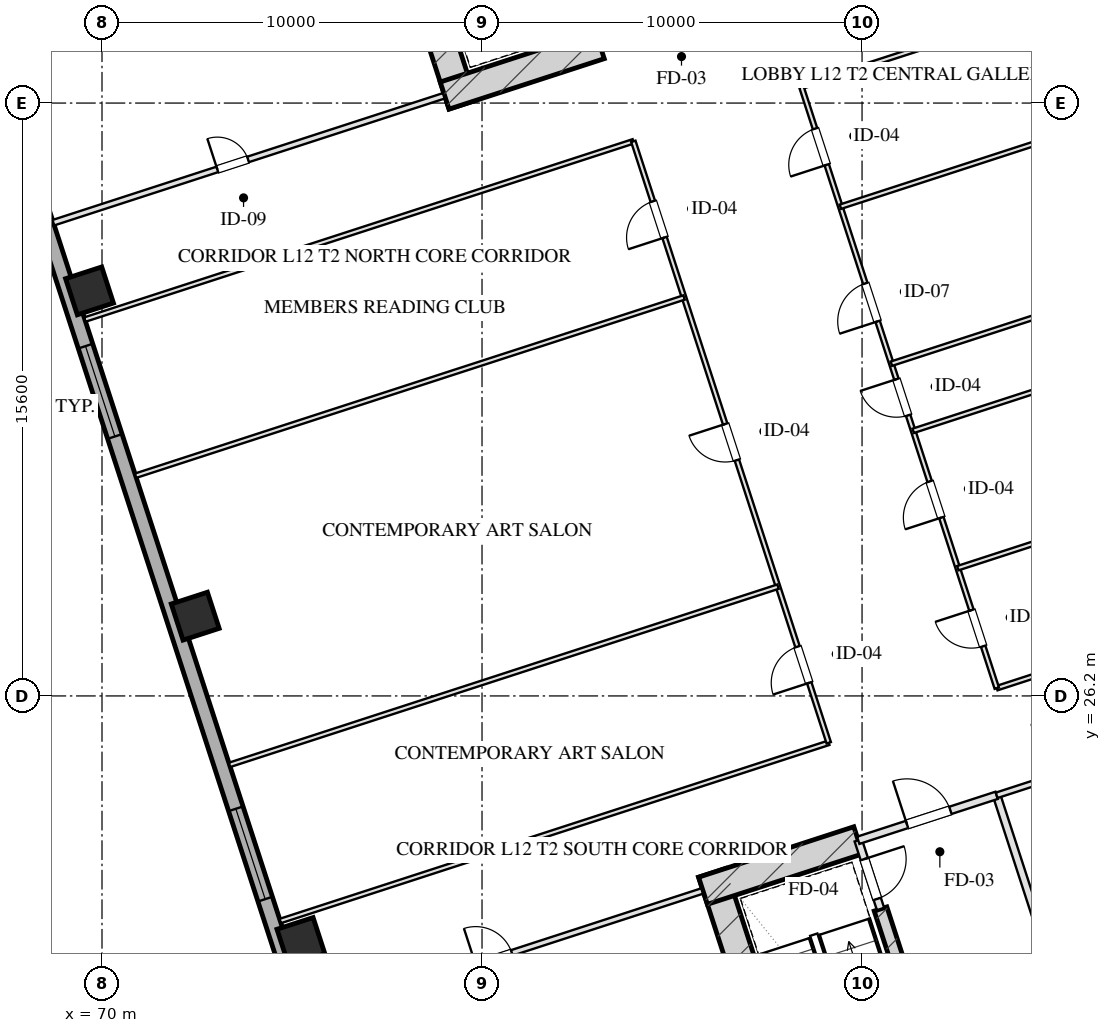
"""IFC4 building model, lengths in metres.
Left out: names, types, materials, properties, quantities, classifications, styles, units other than length and angle.
Written with IfcOpenShell. Run it as: python <this file> out.ifc"""

import sys

from ifc_helpers import new_model, si_unit, direction, frame, frame_2d, origin, origin_2d, place, context, subcontext, project, spatial, rectangle, hollow_rectangle, extrude, element, fill, save


model = new_model("IFC4")
c1 = context("Model", 3, precision=1e-05, world=origin(), true_north=direction((0.0, 1.0)))
c2 = subcontext(c1, "Body", "Model", "MODEL_VIEW")
j1 = project(units=[si_unit("LENGTHUNIT", "METRE"), si_unit("PLANEANGLEUNIT", "RADIAN")], contexts=[c1])
p1 = place(None, origin())
s1 = spatial("IfcSite", under=j1, at=p1, CompositionType="ELEMENT")
p2 = place(p1, origin())
s2 = spatial("IfcBuilding", under=s1, at=p2, CompositionType="ELEMENT")
p3 = place(p2, frame((0.0, 0.0, 54.05)))
s3 = spatial("IfcBuildingStorey", under=s2, at=p3, CompositionType="ELEMENT", Elevation=54.05)
p4 = place(p3, frame((86.055, 21.546, 0.0), z_axis=(0.0, 0.0, 1.0), x_axis=(0.309023585745, -0.951054374604, 0.0)))
e1 = element("IfcWall", 1, at=p4, inside=s3, PredefinedType="SHEAR", context=c2, shape_type="SweptSolid", body=[
    extrude(rectangle(XDim=9.63, YDim=0.75, at=frame_2d((4.815, 0.0))), origin(), (0.0, 0.0, 1.0), 3.45),
])
p5 = place(p3, frame((90.486, 20.594, 0.0), z_axis=(0.0, 0.0, 1.0), x_axis=(0.309020428229, -0.951055400562, 0.0)))
e2 = element("IfcWall", 2, at=p5, inside=s3, PredefinedType="SHEAR", context=c2, shape_type="SweptSolid", body=[
    extrude(rectangle(XDim=6.98, YDim=0.35, at=frame_2d((3.49, 0.0))), origin(), (0.0, 0.0, 1.0), 3.45),
])
p6 = place(p3, frame((85.814, 21.074, 0.0), z_axis=(0.0, 0.0, 1.0), x_axis=(0.95106580992, 0.308988390074, 0.0)))
e3 = element("IfcWall", 3, at=p6, inside=s3, PredefinedType="SHEAR", context=c2, shape_type="SweptSolid", body=[
    extrude(rectangle(XDim=4.295, YDim=0.75, at=frame_2d((2.147, 0.0))), origin(), (0.0, 0.0, 1.0), 3.45),
])
p7 = place(p3, frame((79.489, 41.756, 0.0), z_axis=(0.0, 0.0, 1.0), x_axis=(-0.309016134813, 0.951056795583, 0.0)))
e4 = element("IfcWall", 4, at=p7, inside=s3, PredefinedType="SHEAR", context=c2, shape_type="SweptSolid", body=[
    extrude(rectangle(XDim=9.63, YDim=0.75, at=frame_2d((4.815, 0.0))), origin(), (0.0, 0.0, 1.0), 3.45),
])
p8 = place(p3, frame((79.016, 41.997, 0.0), z_axis=(0.0, 0.0, 1.0), x_axis=(0.95106038264, 0.309005094736, 0.0)))
e5 = element("IfcWall", 5, at=p8, inside=s3, PredefinedType="SHEAR", context=c2, shape_type="SweptSolid", body=[
    extrude(rectangle(XDim=4.295, YDim=0.75, at=frame_2d((2.147, 0.0))), origin(), (0.0, 0.0, 1.0), 3.45),
])
for number, where, z_axis, x_axis in (
    (6, (75.234, 19.739, 0.0), (0.0, 0.0, 1.0), (0.951, 0.309, 0.0)),
    (7, (72.453, 28.299, 0.0), (0.0, 0.0, 1.0), (0.951, 0.309, 0.0)),
    (8, (69.672, 36.858, 0.0), (0.0, 0.0, 1.0), (0.951, 0.309, 0.0)),
):
    element("IfcColumn", number, at=place(p3, frame(where, z_axis=z_axis, x_axis=x_axis)), inside=s3, PredefinedType="COLUMN", context=c2, shape_type="SweptSolid", body=[
        extrude(hollow_rectangle(XDim=1.0, YDim=1.0, WallThickness=0.036, at=origin_2d()), origin(), (0.0, 0.0, 1.0), 3.451),
    ])
p9 = place(p3, frame((79.655, 4.352, 0.0), z_axis=(0.0, 0.0, 1.0), x_axis=(-0.309014526607, 0.951057318118, 0.0)))
e9 = element("IfcWall", 9, at=p9, inside=s3, PredefinedType="SOLIDWALL", context=c2, shape_type="SweptSolid", body=[
    extrude(rectangle(XDim=50.0, YDim=0.4, at=frame_2d((25.0, 0.0))), origin(), (0.0, 0.0, 1.0), 2.61),
])
p10 = place(p9, frame((17.35, 0.0, 0.75)))
e10 = element("IfcOpeningElement", 10, at=p10, cuts=e9, PredefinedType="OPENING", context=c2, shape_type="SweptSolid", body=[
    extrude(rectangle(XDim=2.5, YDim=1.46, at=frame_2d((1.25, 0.73))), frame((0.0, 0.21, 0.0), z_axis=(0.0, -1.0, 0.0), x_axis=(1.0, 0.0, 0.0)), (0.0, 0.0, 1.0), 0.42),
])
p11 = place(p9, frame((30.15, 0.0, 0.75)))
e11 = element("IfcOpeningElement", 11, at=p11, cuts=e9, PredefinedType="OPENING", context=c2, shape_type="SweptSolid", body=[
    extrude(rectangle(XDim=2.5, YDim=1.46, at=frame_2d((1.25, 0.73))), frame((0.0, 0.21, 0.0), z_axis=(0.0, -1.0, 0.0), x_axis=(1.0, 0.0, 0.0)), (0.0, 0.0, 1.0), 0.42),
])
p12 = place(p3, frame((89.899, 22.401, 0.0), z_axis=(0.0, 0.0, 1.0), x_axis=(0.308932062672, -0.951084108086, 0.0)))
e12 = element("IfcWall", 12, at=p12, inside=s3, PredefinedType="PARTITIONING", context=c2, shape_type="SweptSolid", body=[
    extrude(rectangle(XDim=1.9, YDim=0.2, at=frame_2d((0.95, 0.0))), origin(), (0.0, 0.0, 1.0), 3.175),
])
p13 = place(p12, frame((0.52, 0.0, 0.0)))
e13 = element("IfcOpeningElement", 13, at=p13, cuts=e12, PredefinedType="OPENING", context=c2, shape_type="SweptSolid", body=[
    extrude(rectangle(XDim=1.1, YDim=2.05, at=frame_2d((0.55, 1.025))), frame((0.0, 0.11, 0.0), z_axis=(0.0, -1.0, 0.0), x_axis=(1.0, 0.0, 0.0)), (0.0, 0.0, 1.0), 0.22),
])
p14 = place(p3, frame((93.542, 23.585, 0.0), z_axis=(0.0, 0.0, 1.0), x_axis=(0.309042196757, -0.951048327176, 0.0)))
e14 = element("IfcWall", 14, at=p14, inside=s3, PredefinedType="PARTITIONING", context=c2, shape_type="SweptSolid", body=[
    extrude(rectangle(XDim=8.43, YDim=0.2, at=frame_2d((4.215, 0.0))), origin(), (0.0, 0.0, 1.0), 3.175),
])
p15 = place(p3, frame((89.899, 22.401, 0.0), z_axis=(0.0, 0.0, 1.0), x_axis=(0.951046716504, 0.309047153403, 0.0)))
e15 = element("IfcWall", 15, at=p15, inside=s3, PredefinedType="PARTITIONING", context=c2, shape_type="SweptSolid", body=[
    extrude(rectangle(XDim=3.83, YDim=0.2, at=frame_2d((1.915, 0.0))), origin(), (0.0, 0.0, 1.0), 3.175),
])
p16 = place(p15, frame((1.35, 0.0, 0.0)))
e16 = element("IfcOpeningElement", 16, at=p16, cuts=e15, PredefinedType="OPENING", context=c2, shape_type="SweptSolid", body=[
    extrude(rectangle(XDim=1.2, YDim=2.05, at=frame_2d((0.6, 1.025))), frame((0.0, 0.11, 0.0), z_axis=(0.0, -1.0, 0.0), x_axis=(1.0, 0.0, 0.0)), (0.0, 0.0, 1.0), 0.22),
])
p17 = place(p3, frame((93.542, 23.585, 0.0), z_axis=(0.0, 0.0, 1.0), x_axis=(0.951063829732, 0.308994485023, 0.0)))
e17 = element("IfcWall", 17, at=p17, inside=s3, PredefinedType="PARTITIONING", context=c2, shape_type="SweptSolid", body=[
    extrude(rectangle(XDim=4.4, YDim=0.15, at=frame_2d((2.2, 0.0))), origin(), (0.0, 0.0, 1.0), 3.175),
])
p18 = place(p17, frame((1.45, 0.0, 0.0)))
e18 = element("IfcOpeningElement", 18, at=p18, cuts=e17, PredefinedType="OPENING", context=c2, shape_type="SweptSolid", body=[
    extrude(rectangle(XDim=1.5, YDim=2.05, at=frame_2d((0.75, 1.025))), frame((0.0, 0.085, 0.0), z_axis=(0.0, -1.0, 0.0), x_axis=(1.0, 0.0, 0.0)), (0.0, 0.0, 1.0), 0.17),
])
p19 = place(p3, frame((75.519, 17.729, 0.0), z_axis=(0.0, 0.0, 1.0), x_axis=(0.951056658866, 0.309016555588, 0.0)))
e19 = element("IfcWall", 19, at=p19, inside=s3, PredefinedType="PARTITIONING", context=c2, shape_type="SweptSolid", body=[
    extrude(rectangle(XDim=10.8, YDim=0.15, at=frame_2d((5.4, 0.0))), origin(), (0.0, 0.0, 1.0), 3.175),
])
p20 = place(p19, frame((4.536, 0.0, 0.0)))
e20 = element("IfcOpeningElement", 20, at=p20, cuts=e19, PredefinedType="OPENING", context=c2, shape_type="SweptSolid", body=[
    extrude(rectangle(XDim=1.0, YDim=2.05, at=frame_2d((0.5, 1.025))), frame((0.0, 0.085, 0.0), z_axis=(0.0, -1.0, 0.0), x_axis=(1.0, 0.0, 0.0)), (0.0, 0.0, 1.0), 0.17),
])
p21 = place(p3, frame((68.721, 38.652, 0.0), z_axis=(0.0, 0.0, 1.0), x_axis=(0.951056658866, 0.309016555588, 0.0)))
e21 = element("IfcWall", 21, at=p21, inside=s3, PredefinedType="PARTITIONING", context=c2, shape_type="SweptSolid", body=[
    extrude(rectangle(XDim=10.8, YDim=0.15, at=frame_2d((5.4, 0.0))), origin(), (0.0, 0.0, 1.0), 3.175),
])
p22 = place(p21, frame((4.536, 0.0, 0.0)))
e22 = element("IfcOpeningElement", 22, at=p22, cuts=e21, PredefinedType="OPENING", context=c2, shape_type="SweptSolid", body=[
    extrude(rectangle(XDim=0.85, YDim=2.05, at=frame_2d((0.425, 1.025))), frame((0.0, 0.085, 0.0), z_axis=(0.0, -1.0, 0.0), x_axis=(1.0, 0.0, 0.0)), (0.0, 0.0, 1.0), 0.17),
])
p23 = place(p3, frame((74.691, 20.278, 0.0), z_axis=(0.0, 0.0, 1.0), x_axis=(0.951054756643, 0.309022409974, 0.0)))
e23 = element("IfcWall", 23, at=p23, inside=s3, PredefinedType="PARTITIONING", context=c2, shape_type="SweptSolid", body=[
    extrude(rectangle(XDim=15.175, YDim=0.12, at=frame_2d((7.587, 0.0))), origin(), (0.0, 0.0, 1.0), 3.175),
])
p24 = place(p3, frame((93.546, 26.404, 0.0), z_axis=(0.0, 0.0, 1.0), x_axis=(0.951058189574, 0.309011844505, 0.0)))
e24 = element("IfcWall", 24, at=p24, inside=s3, PredefinedType="PARTITIONING", context=c2, shape_type="SweptSolid", body=[
    extrude(rectangle(XDim=17.775, YDim=0.12, at=frame_2d((8.887, 0.0))), origin(), (0.0, 0.0, 1.0), 3.175),
])
p25 = place(p3, frame((69.549, 36.103, 0.0), z_axis=(0.0, 0.0, 1.0), x_axis=(0.951054756643, 0.309022409974, 0.0)))
e25 = element("IfcWall", 25, at=p25, inside=s3, PredefinedType="PARTITIONING", context=c2, shape_type="SweptSolid", body=[
    extrude(rectangle(XDim=15.175, YDim=0.12, at=frame_2d((7.587, 0.0))), origin(), (0.0, 0.0, 1.0), 3.175),
])
p26 = place(p3, frame((88.404, 42.229, 0.0), z_axis=(0.0, 0.0, 1.0), x_axis=(0.951054152931, 0.309024267966, 0.0)))
e26 = element("IfcWall", 26, at=p26, inside=s3, PredefinedType="PARTITIONING", context=c2, shape_type="SweptSolid", body=[
    extrude(rectangle(XDim=17.775, YDim=0.12, at=frame_2d((8.888, 0.0))), origin(), (0.0, 0.0, 1.0), 3.175),
])
p27 = place(p3, frame((89.124, 24.967, 0.0), z_axis=(0.0, 0.0, 1.0), x_axis=(-0.30901773025, 0.951056277195, 0.0)))
e27 = element("IfcWall", 27, at=p27, inside=s3, PredefinedType="PARTITIONING", context=c2, shape_type="SweptSolid", body=[
    extrude(rectangle(XDim=16.64, YDim=0.12, at=frame_2d((8.32, 0.0))), origin(), (0.0, 0.0, 1.0), 3.175),
])
p28 = place(p27, frame((1.66, 0.0, 0.0)))
e28 = element("IfcOpeningElement", 28, at=p28, cuts=e27, PredefinedType="OPENING", context=c2, shape_type="SweptSolid", body=[
    extrude(rectangle(XDim=1.0, YDim=2.05, at=frame_2d((0.5, 1.025))), frame((0.0, 0.07, 0.0), z_axis=(0.0, -1.0, 0.0), x_axis=(1.0, 0.0, 0.0)), (0.0, 0.0, 1.0), 0.14),
])
p29 = place(p27, frame((7.82, 0.0, 0.0)))
e29 = element("IfcOpeningElement", 29, at=p29, cuts=e27, PredefinedType="OPENING", context=c2, shape_type="SweptSolid", body=[
    extrude(rectangle(XDim=1.0, YDim=2.05, at=frame_2d((0.5, 1.025))), frame((0.0, 0.07, 0.0), z_axis=(0.0, -1.0, 0.0), x_axis=(1.0, 0.0, 0.0)), (0.0, 0.0, 1.0), 0.14),
])
p30 = place(p27, frame((13.98, 0.0, 0.0)))
e30 = element("IfcOpeningElement", 30, at=p30, cuts=e27, PredefinedType="OPENING", context=c2, shape_type="SweptSolid", body=[
    extrude(rectangle(XDim=1.0, YDim=2.05, at=frame_2d((0.5, 1.025))), frame((0.0, 0.07, 0.0), z_axis=(0.0, -1.0, 0.0), x_axis=(1.0, 0.0, 0.0)), (0.0, 0.0, 1.0), 0.14),
])
p31 = place(p3, frame((93.546, 26.404, 0.0), z_axis=(0.0, 0.0, 1.0), x_axis=(-0.309022042254, 0.951054876125, 0.0)))
e31 = element("IfcWall", 31, at=p31, inside=s3, PredefinedType="PARTITIONING", context=c2, shape_type="SweptSolid", body=[
    extrude(rectangle(XDim=16.64, YDim=0.12, at=frame_2d((8.32, 0.0))), origin(), (0.0, 0.0, 1.0), 3.175),
])
p32 = place(p31, frame((1.16, 0.0, 0.0)))
e32 = element("IfcOpeningElement", 32, at=p32, cuts=e31, PredefinedType="OPENING", context=c2, shape_type="SweptSolid", body=[
    extrude(rectangle(XDim=1.0, YDim=2.05, at=frame_2d((0.5, 1.025))), frame((0.0, 0.07, 0.0), z_axis=(0.0, -1.0, 0.0), x_axis=(1.0, 0.0, 0.0)), (0.0, 0.0, 1.0), 0.14),
])
p33 = place(p31, frame((4.72, 0.0, 0.0)))
e33 = element("IfcOpeningElement", 33, at=p33, cuts=e31, PredefinedType="OPENING", context=c2, shape_type="SweptSolid", body=[
    extrude(rectangle(XDim=1.0, YDim=2.05, at=frame_2d((0.5, 1.025))), frame((0.0, 0.07, 0.0), z_axis=(0.0, -1.0, 0.0), x_axis=(1.0, 0.0, 0.0)), (0.0, 0.0, 1.0), 0.14),
])
p34 = place(p31, frame((7.549, 0.0, 0.0)))
e34 = element("IfcOpeningElement", 34, at=p34, cuts=e31, PredefinedType="OPENING", context=c2, shape_type="SweptSolid", body=[
    extrude(rectangle(XDim=1.0, YDim=2.05, at=frame_2d((0.5, 1.025))), frame((0.0, 0.07, 0.0), z_axis=(0.0, -1.0, 0.0), x_axis=(1.0, 0.0, 0.0)), (0.0, 0.0, 1.0), 0.14),
])
p35 = place(p31, frame((10.148, 0.0, 0.0)))
e35 = element("IfcOpeningElement", 35, at=p35, cuts=e31, PredefinedType="OPENING", context=c2, shape_type="SweptSolid", body=[
    extrude(rectangle(XDim=1.05, YDim=2.05, at=frame_2d((0.525, 1.025))), frame((0.0, 0.07, 0.0), z_axis=(0.0, -1.0, 0.0), x_axis=(1.0, 0.0, 0.0)), (0.0, 0.0, 1.0), 0.14),
])
p36 = place(p31, frame((14.48, 0.0, 0.0)))
e36 = element("IfcOpeningElement", 36, at=p36, cuts=e31, PredefinedType="OPENING", context=c2, shape_type="SweptSolid", body=[
    extrude(rectangle(XDim=1.0, YDim=2.05, at=frame_2d((0.5, 1.025))), frame((0.0, 0.07, 0.0), z_axis=(0.0, -1.0, 0.0), x_axis=(1.0, 0.0, 0.0)), (0.0, 0.0, 1.0), 0.14),
])
for number, where, z_axis, x_axis in (
    (37, (73.356, 24.386, 0.0), (0.0, 0.0, 1.0), (0.951, 0.309, 0.0)),
    (38, (70.884, 31.995, 0.0), (0.0, 0.0, 1.0), (0.951, 0.309, 0.0)),
):
    element("IfcWall", number, at=place(p3, frame(where, z_axis=z_axis, x_axis=x_axis)), inside=s3, PredefinedType="PARTITIONING", context=c2, shape_type="SweptSolid", body=[
        extrude(rectangle(XDim=15.175, YDim=0.12, at=frame_2d((7.587, 0.0))), origin(), (0.0, 0.0, 1.0), 3.175),
    ])
for number, where, z_axis, x_axis in (
    (39, (92.52, 29.562, 0.0), (0.0, 0.0, 1.0), (0.951, 0.309, 0.0)),
    (40, (91.346, 33.176, 0.0), (0.0, 0.0, 1.0), (0.951, 0.309, 0.0)),
    (41, (90.772, 34.942, 0.0), (0.0, 0.0, 1.0), (0.951, 0.309, 0.0)),
    (42, (89.43, 39.072, 0.0), (0.0, 0.0, 1.0), (0.951, 0.309, 0.0)),
):
    element("IfcWall", number, at=place(p3, frame(where, z_axis=z_axis, x_axis=x_axis)), inside=s3, PredefinedType="PARTITIONING", context=c2, shape_type="SweptSolid", body=[
        extrude(rectangle(XDim=17.775, YDim=0.12, at=frame_2d((8.887, 0.0))), origin(), (0.0, 0.0, 1.0), 3.175),
    ])
p37 = place(p10, origin())
e43 = element("IfcWindow", 43, at=p37, inside=s3, PartitioningType="TRIPLE_PANEL_VERTICAL", PredefinedType="WINDOW", context=c2, shape_type="SweptSolid", body=[
    extrude(rectangle(XDim=2.5, YDim=1.46, at=frame_2d((1.25, 0.73))), frame((0.0, 0.03, 0.0), z_axis=(0.0, -1.0, 0.0), x_axis=(1.0, 0.0, 0.0)), (0.0, 0.0, 1.0), 0.06),
])
fill(e10, e43)
p38 = place(p11, origin())
e44 = element("IfcWindow", 44, at=p38, inside=s3, PartitioningType="TRIPLE_PANEL_VERTICAL", PredefinedType="WINDOW", context=c2, shape_type="SweptSolid", body=[
    extrude(rectangle(XDim=2.5, YDim=1.46, at=frame_2d((1.25, 0.73))), frame((0.0, 0.03, 0.0), z_axis=(0.0, -1.0, 0.0), x_axis=(1.0, 0.0, 0.0)), (0.0, 0.0, 1.0), 0.06),
])
fill(e11, e44)
p39 = place(p13, origin())
e45 = element("IfcDoor", 45, at=p39, inside=s3, OperationType="SINGLE_SWING_LEFT", PredefinedType="DOOR", context=c2, shape_type="SweptSolid", body=[
    extrude(rectangle(XDim=1.1, YDim=2.05, at=frame_2d((0.55, 1.025))), frame((0.0, 0.025, 0.0), z_axis=(0.0, -1.0, 0.0), x_axis=(1.0, 0.0, 0.0)), (0.0, 0.0, 1.0), 0.05),
])
fill(e13, e45)
p40 = place(p16, origin())
e46 = element("IfcDoor", 46, at=p40, inside=s3, OperationType="SINGLE_SWING_LEFT", PredefinedType="DOOR", context=c2, shape_type="SweptSolid", body=[
    extrude(rectangle(XDim=1.2, YDim=2.05, at=frame_2d((0.6, 1.025))), frame((0.0, 0.025, 0.0), z_axis=(0.0, -1.0, 0.0), x_axis=(1.0, 0.0, 0.0)), (0.0, 0.0, 1.0), 0.05),
])
fill(e16, e46)
p41 = place(p20, origin())
e47 = element("IfcDoor", 47, at=p41, inside=s3, OperationType="SINGLE_SWING_LEFT", PredefinedType="DOOR", context=c2, shape_type="SweptSolid", body=[
    extrude(rectangle(XDim=1.0, YDim=2.05, at=frame_2d((0.5, 1.025))), frame((0.0, 0.025, 0.0), z_axis=(0.0, -1.0, 0.0), x_axis=(1.0, 0.0, 0.0)), (0.0, 0.0, 1.0), 0.05),
])
fill(e20, e47)
p42 = place(p22, origin())
e48 = element("IfcDoor", 48, at=p42, inside=s3, OperationType="SINGLE_SWING_LEFT", PredefinedType="DOOR", context=c2, shape_type="SweptSolid", body=[
    extrude(rectangle(XDim=0.85, YDim=2.05, at=frame_2d((0.425, 1.025))), frame((0.0, 0.025, 0.0), z_axis=(0.0, -1.0, 0.0), x_axis=(1.0, 0.0, 0.0)), (0.0, 0.0, 1.0), 0.05),
])
fill(e22, e48)
p43 = place(p28, origin())
e49 = element("IfcDoor", 49, at=p43, inside=s3, OperationType="SINGLE_SWING_LEFT", PredefinedType="DOOR", context=c2, shape_type="SweptSolid", body=[
    extrude(rectangle(XDim=1.0, YDim=2.05, at=frame_2d((0.5, 1.025))), frame((0.0, 0.025, 0.0), z_axis=(0.0, -1.0, 0.0), x_axis=(1.0, 0.0, 0.0)), (0.0, 0.0, 1.0), 0.05),
])
fill(e28, e49)
p44 = place(p29, origin())
e50 = element("IfcDoor", 50, at=p44, inside=s3, OperationType="SINGLE_SWING_RIGHT", PredefinedType="DOOR", context=c2, shape_type="SweptSolid", body=[
    extrude(rectangle(XDim=1.0, YDim=2.05, at=frame_2d((0.5, 1.025))), frame((0.0, 0.025, 0.0), z_axis=(0.0, -1.0, 0.0), x_axis=(1.0, 0.0, 0.0)), (0.0, 0.0, 1.0), 0.05),
])
fill(e29, e50)
p45 = place(p30, origin())
e51 = element("IfcDoor", 51, at=p45, inside=s3, OperationType="SINGLE_SWING_LEFT", PredefinedType="DOOR", context=c2, shape_type="SweptSolid", body=[
    extrude(rectangle(XDim=1.0, YDim=2.05, at=frame_2d((0.5, 1.025))), frame((0.0, 0.025, 0.0), z_axis=(0.0, -1.0, 0.0), x_axis=(1.0, 0.0, 0.0)), (0.0, 0.0, 1.0), 0.05),
])
fill(e30, e51)
p46 = place(p32, origin())
e52 = element("IfcDoor", 52, at=p46, inside=s3, OperationType="SINGLE_SWING_RIGHT", PredefinedType="DOOR", context=c2, shape_type="SweptSolid", body=[
    extrude(rectangle(XDim=1.0, YDim=2.05, at=frame_2d((0.5, 1.025))), frame((0.0, 0.025, 0.0), z_axis=(0.0, -1.0, 0.0), x_axis=(1.0, 0.0, 0.0)), (0.0, 0.0, 1.0), 0.05),
])
fill(e32, e52)
p47 = place(p33, origin())
e53 = element("IfcDoor", 53, at=p47, inside=s3, OperationType="SINGLE_SWING_LEFT", PredefinedType="DOOR", context=c2, shape_type="SweptSolid", body=[
    extrude(rectangle(XDim=1.0, YDim=2.05, at=frame_2d((0.5, 1.025))), frame((0.0, 0.025, 0.0), z_axis=(0.0, -1.0, 0.0), x_axis=(1.0, 0.0, 0.0)), (0.0, 0.0, 1.0), 0.05),
])
fill(e33, e53)
p48 = place(p34, origin())
e54 = element("IfcDoor", 54, at=p48, inside=s3, OperationType="SINGLE_SWING_RIGHT", PredefinedType="DOOR", context=c2, shape_type="SweptSolid", body=[
    extrude(rectangle(XDim=1.0, YDim=2.05, at=frame_2d((0.5, 1.025))), frame((0.0, 0.025, 0.0), z_axis=(0.0, -1.0, 0.0), x_axis=(1.0, 0.0, 0.0)), (0.0, 0.0, 1.0), 0.05),
])
fill(e34, e54)
p49 = place(p35, origin())
e55 = element("IfcDoor", 55, at=p49, inside=s3, OperationType="SINGLE_SWING_LEFT", PredefinedType="DOOR", context=c2, shape_type="SweptSolid", body=[
    extrude(rectangle(XDim=1.05, YDim=2.05, at=frame_2d((0.525, 1.025))), frame((0.0, 0.025, 0.0), z_axis=(0.0, -1.0, 0.0), x_axis=(1.0, 0.0, 0.0)), (0.0, 0.0, 1.0), 0.05),
])
fill(e35, e55)
p50 = place(p36, origin())
e56 = element("IfcDoor", 56, at=p50, inside=s3, OperationType="SINGLE_SWING_LEFT", PredefinedType="DOOR", context=c2, shape_type="SweptSolid", body=[
    extrude(rectangle(XDim=1.0, YDim=2.05, at=frame_2d((0.5, 1.025))), frame((0.0, 0.025, 0.0), z_axis=(0.0, -1.0, 0.0), x_axis=(1.0, 0.0, 0.0)), (0.0, 0.0, 1.0), 0.05),
])
fill(e36, e56)
save(model, sys.argv[1])
